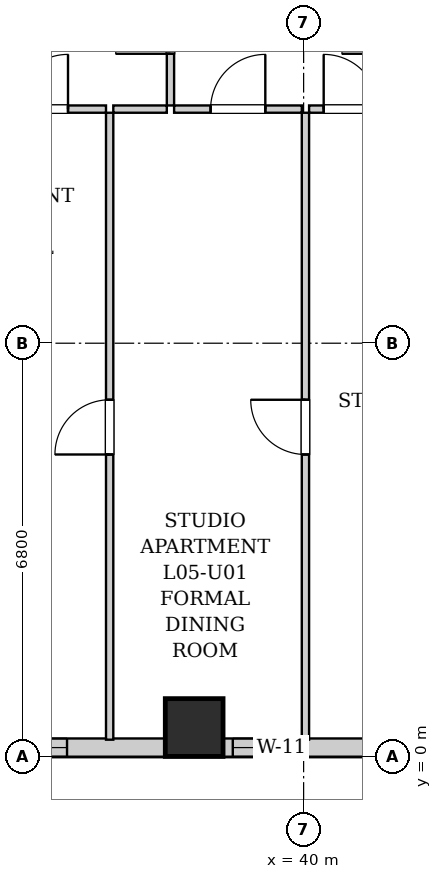
"""IFC4 building model, lengths in metres.
Left out: names, types, materials, properties, quantities, classifications, styles, units other than length and angle.
Written with IfcOpenShell. Run it as: python <this file> out.ifc"""

import sys

from ifc_helpers import new_model, si_unit, direction, frame, frame_2d, origin, origin_2d, place, context, subcontext, project, spatial, rectangle, extrude, element, fill, save


model = new_model("IFC4")
c1 = context("Model", 3, precision=1e-05, world=origin(), true_north=direction((0.0, 1.0)))
c2 = subcontext(c1, "Body", "Model", "MODEL_VIEW")
j1 = project(units=[si_unit("LENGTHUNIT", "METRE"), si_unit("PLANEANGLEUNIT", "RADIAN")], contexts=[c1])
p1 = place(None, origin())
s1 = spatial("IfcSite", under=j1, at=p1, CompositionType="ELEMENT")
p2 = place(p1, origin())
s2 = spatial("IfcBuilding", under=s1, at=p2, CompositionType="ELEMENT")
p3 = place(p2, frame((0.0, 0.0, 25.8)))
s3 = spatial("IfcBuildingStorey", under=s2, at=p3, CompositionType="ELEMENT", Elevation=25.8)
p4 = place(p3, frame((38.2, 0.48, 0.0), z_axis=(0.0, 0.0, 1.0), x_axis=(1.0, 0.0, 0.0)))
e1 = element("IfcColumn", 1, at=p4, inside=s3, PredefinedType="COLUMN", context=c2, shape_type="SweptSolid", body=[
    extrude(rectangle(XDim=0.95, YDim=0.95, at=origin_2d()), origin(), (0.0, 0.0, 1.0), 3.2),
])
p5 = place(p3, frame((44.0, 0.15, 0.0), z_axis=(0.0, 0.0, 1.0), x_axis=(-1.0, 0.0, 0.0)))
e2 = element("IfcWall", 2, at=p5, inside=s3, PredefinedType="SOLIDWALL", context=c2, shape_type="SweptSolid", body=[
    extrude(rectangle(XDim=28.1, YDim=0.3, at=frame_2d((14.05, 0.0))), origin(), (0.0, 0.0, 1.0), 1.975),
])
p6 = place(p5, frame((26.835, 0.0, 0.55)))
e3 = element("IfcOpeningElement", 3, at=p6, cuts=e2, PredefinedType="OPENING", context=c2, shape_type="SweptSolid", body=[
    extrude(rectangle(XDim=0.85, YDim=1.2, at=frame_2d((0.425, 0.6))), frame((0.0, 0.16, 0.0), z_axis=(0.0, -1.0, 0.0), x_axis=(1.0, 0.0, 0.0)), (0.0, 0.0, 1.0), 0.32),
])
p7 = place(p5, frame((23.765, 0.0, 0.55)))
e4 = element("IfcOpeningElement", 4, at=p7, cuts=e2, PredefinedType="OPENING", context=c2, shape_type="SweptSolid", body=[
    extrude(rectangle(XDim=1.8, YDim=1.2, at=frame_2d((0.9, 0.6))), frame((0.0, 0.16, 0.0), z_axis=(0.0, -1.0, 0.0), x_axis=(1.0, 0.0, 0.0)), (0.0, 0.0, 1.0), 0.32),
])
p8 = place(p5, frame((21.5, 0.0, 0.55)))
e5 = element("IfcOpeningElement", 5, at=p8, cuts=e2, PredefinedType="OPENING", context=c2, shape_type="SweptSolid", body=[
    extrude(rectangle(XDim=1.35, YDim=1.2, at=frame_2d((0.675, 0.6))), frame((0.0, 0.16, 0.0), z_axis=(0.0, -1.0, 0.0), x_axis=(1.0, 0.0, 0.0)), (0.0, 0.0, 1.0), 0.32),
])
p9 = place(p5, frame((14.352, 0.0, 0.55)))
e6 = element("IfcOpeningElement", 6, at=p9, cuts=e2, PredefinedType="OPENING", context=c2, shape_type="SweptSolid", body=[
    extrude(rectangle(XDim=1.8, YDim=1.2, at=frame_2d((0.9, 0.6))), frame((0.0, 0.16, 0.0), z_axis=(0.0, -1.0, 0.0), x_axis=(1.0, 0.0, 0.0)), (0.0, 0.0, 1.0), 0.32),
])
p10 = place(p5, frame((11.435, 0.0, 0.55)))
e7 = element("IfcOpeningElement", 7, at=p10, cuts=e2, PredefinedType="OPENING", context=c2, shape_type="SweptSolid", body=[
    extrude(rectangle(XDim=1.8, YDim=1.2, at=frame_2d((0.9, 0.6))), frame((0.0, 0.16, 0.0), z_axis=(0.0, -1.0, 0.0), x_axis=(1.0, 0.0, 0.0)), (0.0, 0.0, 1.0), 0.32),
])
p11 = place(p5, frame((7.891, 0.0, 0.55)))
e8 = element("IfcOpeningElement", 8, at=p11, cuts=e2, PredefinedType="OPENING", context=c2, shape_type="SweptSolid", body=[
    extrude(rectangle(XDim=1.8, YDim=1.2, at=frame_2d((0.9, 0.6))), frame((0.0, 0.16, 0.0), z_axis=(0.0, -1.0, 0.0), x_axis=(1.0, 0.0, 0.0)), (0.0, 0.0, 1.0), 0.32),
])
p12 = place(p5, frame((4.315, 0.0, 0.55)))
e9 = element("IfcOpeningElement", 9, at=p12, cuts=e2, PredefinedType="OPENING", context=c2, shape_type="SweptSolid", body=[
    extrude(rectangle(XDim=0.85, YDim=1.2, at=frame_2d((0.425, 0.6))), frame((0.0, 0.16, 0.0), z_axis=(0.0, -1.0, 0.0), x_axis=(1.0, 0.0, 0.0)), (0.0, 0.0, 1.0), 0.32),
])
p13 = place(p3, frame((37.81, 10.71, 0.0), z_axis=(0.0, 0.0, 1.0), x_axis=(0.0, 1.0, 0.0)))
e10 = element("IfcWall", 10, at=p13, inside=s3, PredefinedType="PARTITIONING", context=c2, shape_type="SweptSolid", body=[
    extrude(rectangle(XDim=2.6, YDim=0.12, at=frame_2d((1.3, 0.0))), origin(), (0.0, 0.0, 1.0), 2.94),
])
p14 = place(p13, frame((0.85, 0.0, 0.0)))
e11 = element("IfcOpeningElement", 11, at=p14, cuts=e10, PredefinedType="OPENING", context=c2, shape_type="SweptSolid", body=[
    extrude(rectangle(XDim=0.9, YDim=2.05, at=frame_2d((0.45, 1.025))), frame((0.0, 0.07, 0.0), z_axis=(0.0, -1.0, 0.0), x_axis=(1.0, 0.0, 0.0)), (0.0, 0.0, 1.0), 0.14),
])
p15 = place(p3, frame((34.6, 10.65, 0.0), z_axis=(0.0, 0.0, 1.0), x_axis=(1.0, 0.0, 0.0)))
e12 = element("IfcWall", 12, at=p15, inside=s3, PredefinedType="PARTITIONING", context=c2, shape_type="SweptSolid", body=[
    extrude(rectangle(XDim=2.15, YDim=0.12, at=frame_2d((1.075, 0.0))), origin(), (0.0, 0.0, 1.0), 2.94),
])
p16 = place(p15, frame((0.625, 0.0, 0.0)))
e13 = element("IfcOpeningElement", 13, at=p16, cuts=e12, PredefinedType="OPENING", context=c2, shape_type="SweptSolid", body=[
    extrude(rectangle(XDim=0.9, YDim=2.05, at=frame_2d((0.45, 1.025))), frame((0.0, 0.07, 0.0), z_axis=(0.0, -1.0, 0.0), x_axis=(1.0, 0.0, 0.0)), (0.0, 0.0, 1.0), 0.14),
])
p17 = place(p3, frame((36.87, 10.65, 0.0), z_axis=(0.0, 0.0, 1.0), x_axis=(1.0, 0.0, 0.0)))
e14 = element("IfcWall", 14, at=p17, inside=s3, PredefinedType="PARTITIONING", context=c2, shape_type="SweptSolid", body=[
    extrude(rectangle(XDim=0.88, YDim=0.12, at=frame_2d((0.44, 0.0))), origin(), (0.0, 0.0, 1.0), 2.94),
])
p18 = place(p3, frame((37.87, 10.65, 0.0), z_axis=(0.0, 0.0, 1.0), x_axis=(1.0, 0.0, 0.0)))
e15 = element("IfcWall", 15, at=p18, inside=s3, PredefinedType="PARTITIONING", context=c2, shape_type="SweptSolid", body=[
    extrude(rectangle(XDim=2.1, YDim=0.12, at=frame_2d((1.05, 0.0))), origin(), (0.0, 0.0, 1.0), 2.94),
])
p19 = place(p18, frame((0.6, 0.0, 0.0)))
e16 = element("IfcOpeningElement", 16, at=p19, cuts=e15, PredefinedType="OPENING", context=c2, shape_type="SweptSolid", body=[
    extrude(rectangle(XDim=0.9, YDim=2.05, at=frame_2d((0.45, 1.025))), frame((0.0, 0.07, 0.0), z_axis=(0.0, -1.0, 0.0), x_axis=(1.0, 0.0, 0.0)), (0.0, 0.0, 1.0), 0.14),
])
p20 = place(p3, frame((40.09, 10.65, 0.0), z_axis=(0.0, 0.0, 1.0), x_axis=(1.0, 0.0, 0.0)))
e17 = element("IfcWall", 17, at=p20, inside=s3, PredefinedType="PARTITIONING", context=c2, shape_type="SweptSolid", body=[
    extrude(rectangle(XDim=1.38, YDim=0.12, at=frame_2d((0.69, 0.0))), origin(), (0.0, 0.0, 1.0), 2.94),
])
p21 = place(p20, frame((0.24, 0.0, 0.0)))
e18 = element("IfcOpeningElement", 18, at=p21, cuts=e17, PredefinedType="OPENING", context=c2, shape_type="SweptSolid", body=[
    extrude(rectangle(XDim=0.9, YDim=2.05, at=frame_2d((0.45, 1.025))), frame((0.0, 0.07, 0.0), z_axis=(0.0, -1.0, 0.0), x_axis=(1.0, 0.0, 0.0)), (0.0, 0.0, 1.0), 0.14),
])
p22 = place(p3, frame((36.81, 0.28, 0.0), z_axis=(0.0, 0.0, 1.0), x_axis=(0.0, 1.0, 0.0)))
e19 = element("IfcWall", 19, at=p22, inside=s3, PredefinedType="PARTITIONING", context=c2, shape_type="SweptSolid", body=[
    extrude(rectangle(XDim=10.31, YDim=0.12, at=frame_2d((5.155, 0.0))), origin(), (0.0, 0.0, 1.0), 2.94),
])
p23 = place(p22, frame((4.69, 0.0, 0.0)))
e20 = element("IfcOpeningElement", 20, at=p23, cuts=e19, PredefinedType="OPENING", context=c2, shape_type="SweptSolid", body=[
    extrude(rectangle(XDim=0.9, YDim=2.05, at=frame_2d((0.45, 1.025))), frame((0.0, 0.07, 0.0), z_axis=(0.0, -1.0, 0.0), x_axis=(1.0, 0.0, 0.0)), (0.0, 0.0, 1.0), 0.14),
])
p24 = place(p3, frame((40.03, 0.28, 0.0), z_axis=(0.0, 0.0, 1.0), x_axis=(0.0, 1.0, 0.0)))
e21 = element("IfcWall", 21, at=p24, inside=s3, PredefinedType="PARTITIONING", context=c2, shape_type="SweptSolid", body=[
    extrude(rectangle(XDim=10.31, YDim=0.12, at=frame_2d((5.155, 0.0))), origin(), (0.0, 0.0, 1.0), 2.94),
])
p25 = place(p24, frame((4.69, 0.0, 0.0)))
e22 = element("IfcOpeningElement", 22, at=p25, cuts=e21, PredefinedType="OPENING", context=c2, shape_type="SweptSolid", body=[
    extrude(rectangle(XDim=0.9, YDim=2.05, at=frame_2d((0.45, 1.025))), frame((0.0, 0.07, 0.0), z_axis=(0.0, -1.0, 0.0), x_axis=(1.0, 0.0, 0.0)), (0.0, 0.0, 1.0), 0.14),
])
p26 = place(p14, origin())
e23 = element("IfcDoor", 23, at=p26, inside=s3, OperationType="SINGLE_SWING_LEFT", PredefinedType="DOOR", context=c2, shape_type="SweptSolid", body=[
    extrude(rectangle(XDim=0.9, YDim=2.05, at=frame_2d((0.45, 1.025))), frame((0.0, 0.025, 0.0), z_axis=(0.0, -1.0, 0.0), x_axis=(1.0, 0.0, 0.0)), (0.0, 0.0, 1.0), 0.05),
])
fill(e11, e23)
p27 = place(p16, origin())
e24 = element("IfcDoor", 24, at=p27, inside=s3, OperationType="SINGLE_SWING_RIGHT", PredefinedType="DOOR", context=c2, shape_type="SweptSolid", body=[
    extrude(rectangle(XDim=0.9, YDim=2.05, at=frame_2d((0.45, 1.025))), frame((0.0, 0.025, 0.0), z_axis=(0.0, -1.0, 0.0), x_axis=(1.0, 0.0, 0.0)), (0.0, 0.0, 1.0), 0.05),
])
fill(e13, e24)
p28 = place(p19, origin())
e25 = element("IfcDoor", 25, at=p28, inside=s3, OperationType="SINGLE_SWING_RIGHT", PredefinedType="DOOR", context=c2, shape_type="SweptSolid", body=[
    extrude(rectangle(XDim=0.9, YDim=2.05, at=frame_2d((0.45, 1.025))), frame((0.0, 0.025, 0.0), z_axis=(0.0, -1.0, 0.0), x_axis=(1.0, 0.0, 0.0)), (0.0, 0.0, 1.0), 0.05),
])
fill(e16, e25)
p29 = place(p21, origin())
e26 = element("IfcDoor", 26, at=p29, inside=s3, OperationType="SINGLE_SWING_LEFT", PredefinedType="DOOR", context=c2, shape_type="SweptSolid", body=[
    extrude(rectangle(XDim=0.9, YDim=2.05, at=frame_2d((0.45, 1.025))), frame((0.0, 0.025, 0.0), z_axis=(0.0, -1.0, 0.0), x_axis=(1.0, 0.0, 0.0)), (0.0, 0.0, 1.0), 0.05),
])
fill(e18, e26)
p30 = place(p23, origin())
e27 = element("IfcDoor", 27, at=p30, inside=s3, OperationType="SINGLE_SWING_LEFT", PredefinedType="DOOR", context=c2, shape_type="SweptSolid", body=[
    extrude(rectangle(XDim=0.9, YDim=2.05, at=frame_2d((0.45, 1.025))), frame((0.0, 0.025, 0.0), z_axis=(0.0, -1.0, 0.0), x_axis=(1.0, 0.0, 0.0)), (0.0, 0.0, 1.0), 0.05),
])
fill(e20, e27)
p31 = place(p25, origin())
e28 = element("IfcDoor", 28, at=p31, inside=s3, OperationType="SINGLE_SWING_RIGHT", PredefinedType="DOOR", context=c2, shape_type="SweptSolid", body=[
    extrude(rectangle(XDim=0.9, YDim=2.05, at=frame_2d((0.45, 1.025))), frame((0.0, 0.025, 0.0), z_axis=(0.0, -1.0, 0.0), x_axis=(1.0, 0.0, 0.0)), (0.0, 0.0, 1.0), 0.05),
])
fill(e22, e28)
p32 = place(p11, origin())
e29 = element("IfcWindow", 29, at=p32, inside=s3, PartitioningType="DOUBLE_PANEL_VERTICAL", PredefinedType="WINDOW", context=c2, shape_type="SweptSolid", body=[
    extrude(rectangle(XDim=1.8, YDim=1.2, at=frame_2d((0.9, 0.6))), frame((0.0, 0.03, 0.0), z_axis=(0.0, -1.0, 0.0), x_axis=(1.0, 0.0, 0.0)), (0.0, 0.0, 1.0), 0.06),
])
fill(e8, e29)
p33 = place(p12, origin())
e30 = element("IfcWindow", 30, at=p33, inside=s3, PartitioningType="SINGLE_PANEL", PredefinedType="WINDOW", context=c2, shape_type="SweptSolid", body=[
    extrude(rectangle(XDim=0.85, YDim=1.2, at=frame_2d((0.425, 0.6))), frame((0.0, 0.03, 0.0), z_axis=(0.0, -1.0, 0.0), x_axis=(1.0, 0.0, 0.0)), (0.0, 0.0, 1.0), 0.06),
])
fill(e9, e30)
save(model, sys.argv[1])
